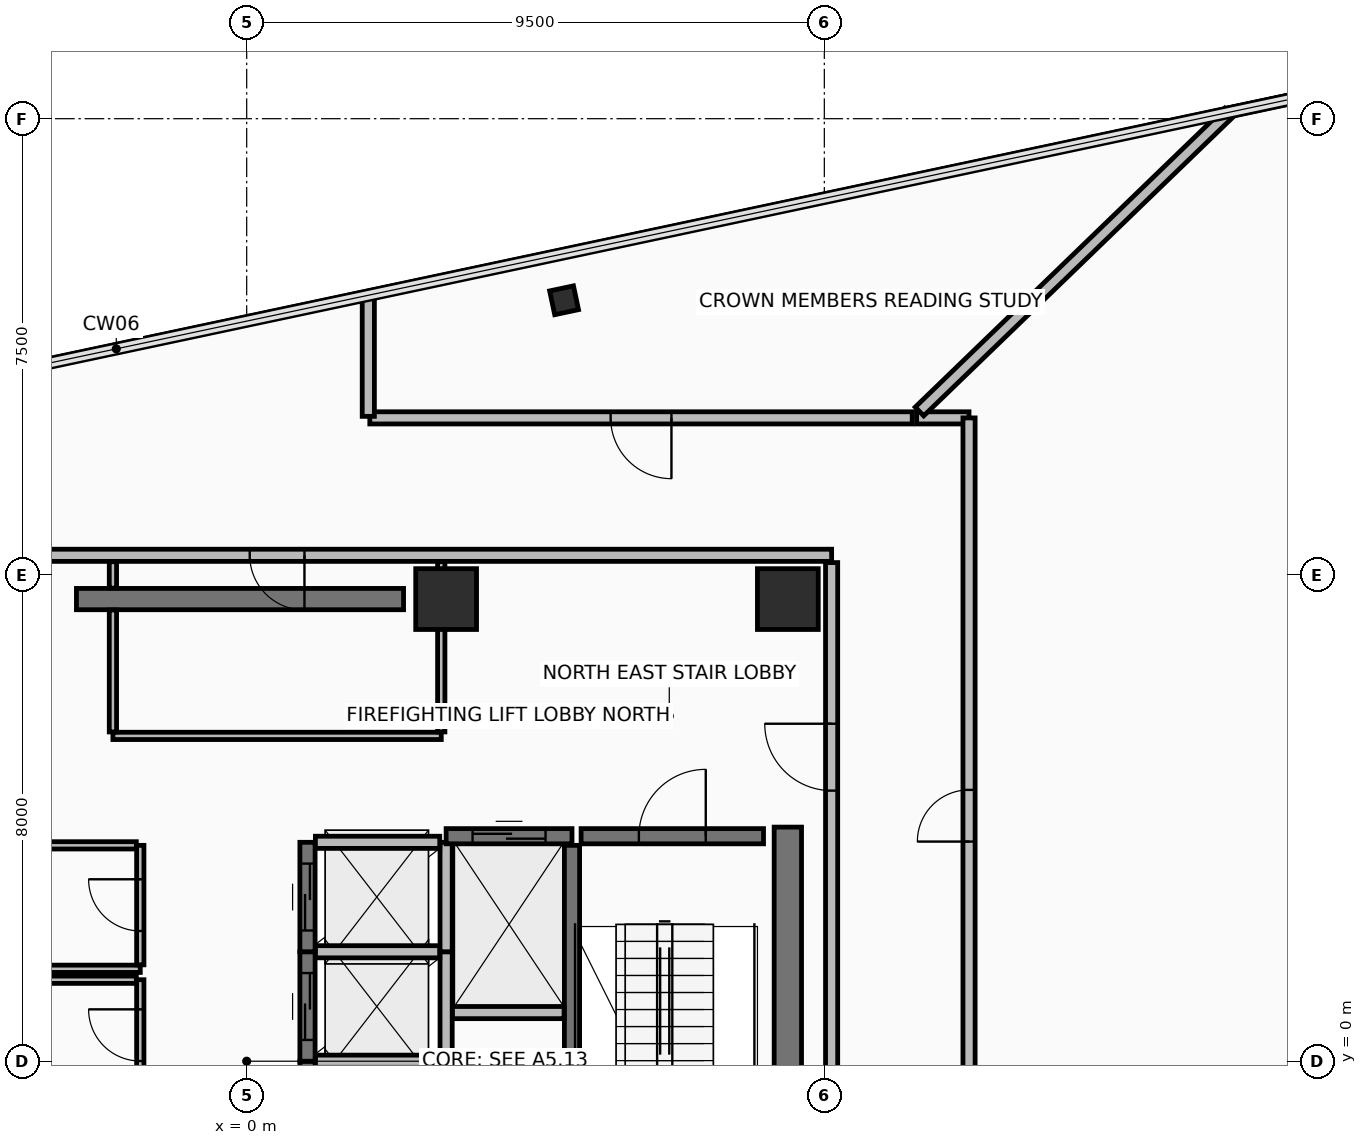
"""IFC4 building model, lengths in metres.
Left out: names, types, materials, properties, quantities, classifications, styles, units other than length and angle.
Written with IfcOpenShell. Run it as: python <this file> out.ifc"""

import sys

from ifc_helpers import new_model, si_unit, direction, frame, frame_2d, origin, origin_2d, place, context, subcontext, project, spatial, rectangle, hollow_rectangle, extrude, element, fill, save


model = new_model("IFC4")
c1 = context("Model", 3, precision=1e-05, world=origin(), true_north=direction((0.0, 1.0)))
c2 = subcontext(c1, "Body", "Model", "MODEL_VIEW")
j1 = project(units=[si_unit("LENGTHUNIT", "METRE"), si_unit("PLANEANGLEUNIT", "RADIAN")], contexts=[c1])
p1 = place(None, origin())
s1 = spatial("IfcSite", under=j1, at=p1, CompositionType="ELEMENT")
p2 = place(p1, origin())
s2 = spatial("IfcBuilding", under=s1, at=p2, CompositionType="ELEMENT")
p3 = place(p2, frame((0.0, 0.0, 283.4)))
s3 = spatial("IfcBuildingStorey", under=s2, at=p3, CompositionType="ELEMENT", Elevation=283.4)
for number, where, z_axis, x_axis in (
    (1, (8.9, 7.6, 0.0), (0.0, 0.0, 1.0), (1.0, 0.0, 0.0)),
    (2, (3.28, 7.6, 0.0), (0.0, 0.0, 1.0), (1.0, 0.0, 0.0)),
):
    element("IfcColumn", number, at=place(p3, frame(where, z_axis=z_axis, x_axis=x_axis)), inside=s3, PredefinedType="COLUMN", context=c2, shape_type="SweptSolid", body=[
        extrude(rectangle(XDim=1.0, YDim=1.0, at=origin_2d()), origin(), (0.0, 0.0, 1.0), 3.65),
    ])
p4 = place(p3, frame((5.22, 12.514, 0.0), z_axis=(0.0, 0.0, 1.0), x_axis=(0.978147237858, 0.207913398007, 0.0)))
e3 = element("IfcColumn", 3, at=p4, inside=s3, PredefinedType="COLUMN", context=c2, shape_type="SweptSolid", body=[
    extrude(hollow_rectangle(XDim=0.4, YDim=0.4, WallThickness=0.025, at=origin_2d()), origin(), (0.0, 0.0, 1.0), 3.65),
])
p5 = place(p3, frame((-2.8, 7.6, 0.0), z_axis=(0.0, 0.0, 1.0), x_axis=(1.0, 0.0, 0.0)))
e4 = element("IfcWall", 4, at=p5, inside=s3, PredefinedType="SHEAR", context=c2, shape_type="SweptSolid", body=[
    extrude(rectangle(XDim=5.38, YDim=0.35, at=frame_2d((2.69, 0.0))), origin(), (0.0, 0.0, 1.0), 3.465),
])
p6 = place(p3, frame((8.9, -6.85, 0.0), z_axis=(0.0, 0.0, 1.0), x_axis=(0.0, 1.0, 0.0)))
e5 = element("IfcWall", 5, at=p6, inside=s3, PredefinedType="SHEAR", context=c2, shape_type="SweptSolid", body=[
    extrude(rectangle(XDim=10.7, YDim=0.45, at=frame_2d((5.35, 0.0))), origin(), (0.0, 0.0, 1.0), 3.465),
])
p7 = place(p3, frame((9.62, 8.32, 0.0), z_axis=(0.0, 0.0, 1.0), x_axis=(-1.0, 0.0, 0.0)))
e6 = element("IfcWall", 6, at=p7, inside=s3, PredefinedType="PARTITIONING", context=c2, shape_type="SweptSolid", body=[
    extrude(rectangle(XDim=19.24, YDim=0.2, at=frame_2d((9.62, 0.0))), origin(), (0.0, 0.0, 1.0), 2.96),
])
p8 = place(p7, frame((8.67, 0.0, 0.0)))
e7 = element("IfcOpeningElement", 7, at=p8, cuts=e6, PredefinedType="OPENING", context=c2, shape_type="SweptSolid", body=[
    extrude(rectangle(XDim=0.9, YDim=2.1, at=frame_2d((0.45, 1.05))), frame((0.0, 0.11, 0.0), z_axis=(0.0, -1.0, 0.0), x_axis=(1.0, 0.0, 0.0)), (0.0, 0.0, 1.0), 0.22),
])
p9 = place(p7, frame((15.745, 0.0, 0.0)))
e8 = element("IfcOpeningElement", 8, at=p9, cuts=e6, PredefinedType="OPENING", context=c2, shape_type="SweptSolid", body=[
    extrude(rectangle(XDim=0.9, YDim=2.1, at=frame_2d((0.45, 1.05))), frame((0.0, 0.11, 0.0), z_axis=(0.0, -1.0, 0.0), x_axis=(1.0, 0.0, 0.0)), (0.0, 0.0, 1.0), 0.22),
])
p10 = place(p7, frame((13.795, 0.0, 0.0)))
e9 = element("IfcOpeningElement", 9, at=p10, cuts=e6, PredefinedType="OPENING", context=c2, shape_type="SweptSolid", body=[
    extrude(rectangle(XDim=0.9, YDim=2.1, at=frame_2d((0.45, 1.05))), frame((0.0, 0.11, 0.0), z_axis=(0.0, -1.0, 0.0), x_axis=(1.0, 0.0, 0.0)), (0.0, 0.0, 1.0), 0.22),
])
p11 = place(p3, frame((9.62, -8.2, 0.0), z_axis=(0.0, 0.0, 1.0), x_axis=(0.0, 1.0, 0.0)))
e10 = element("IfcWall", 10, at=p11, inside=s3, PredefinedType="PARTITIONING", context=c2, shape_type="SweptSolid", body=[
    extrude(rectangle(XDim=16.4, YDim=0.2, at=frame_2d((8.2, 0.0))), origin(), (0.0, 0.0, 1.0), 2.96),
])
p12 = place(p11, frame((12.65, 0.0, 0.0)))
e11 = element("IfcOpeningElement", 11, at=p12, cuts=e10, PredefinedType="OPENING", context=c2, shape_type="SweptSolid", body=[
    extrude(rectangle(XDim=1.1, YDim=2.15, at=frame_2d((0.55, 1.075))), frame((0.0, 0.11, 0.0), z_axis=(0.0, -1.0, 0.0), x_axis=(1.0, 0.0, 0.0)), (0.0, 0.0, 1.0), 0.22),
])
p13 = place(p3, frame((5.35, -3.75, 0.0), z_axis=(0.0, 0.0, 1.0), x_axis=(0.0, 1.0, 0.0)))
e12 = element("IfcWall", 12, at=p13, inside=s3, PredefinedType="SHEAR", context=c2, shape_type="SweptSolid", body=[
    extrude(rectangle(XDim=7.3, YDim=0.25, at=frame_2d((3.65, 0.0))), origin(), (0.0, 0.0, 1.0), 3.465),
])
p14 = place(p3, frame((5.5, 3.7, 0.0), z_axis=(0.0, 0.0, 1.0), x_axis=(1.0, 0.0, 0.0)))
e13 = element("IfcWall", 13, at=p14, inside=s3, PredefinedType="SHEAR", context=c2, shape_type="SweptSolid", body=[
    extrude(rectangle(XDim=3.0, YDim=0.25, at=frame_2d((1.5, 0.0))), origin(), (0.0, 0.0, 1.0), 3.465),
])
p15 = place(p14, frame((0.95, 0.0, 0.0)))
e14 = element("IfcOpeningElement", 14, at=p15, cuts=e13, PredefinedType="OPENING", context=c2, shape_type="SweptSolid", body=[
    extrude(rectangle(XDim=1.1, YDim=2.15, at=frame_2d((0.55, 1.075))), frame((0.0, 0.135, 0.0), z_axis=(0.0, -1.0, 0.0), x_axis=(1.0, 0.0, 0.0)), (0.0, 0.0, 1.0), 0.27),
])
p16 = place(p3, frame((1.0, -1.8, 0.0), z_axis=(0.0, 0.0, 1.0), x_axis=(0.0, 1.0, 0.0)))
e15 = element("IfcWall", 15, at=p16, inside=s3, PredefinedType="SHEAR", context=c2, shape_type="SweptSolid", body=[
    extrude(rectangle(XDim=1.8, YDim=0.25, at=frame_2d((0.9, 0.0))), origin(), (0.0, 0.0, 1.0), 3.465),
])
p17 = place(p16, frame((0.35, 0.0, 0.0)))
e16 = element("IfcOpeningElement", 16, at=p17, cuts=e15, PredefinedType="OPENING", context=c2, shape_type="SweptSolid", body=[
    extrude(rectangle(XDim=1.1, YDim=2.2, at=frame_2d((0.55, 1.1))), frame((0.0, 0.135, 0.0), z_axis=(0.0, -1.0, 0.0), x_axis=(1.0, 0.0, 0.0)), (0.0, 0.0, 1.0), 0.27),
])
p18 = place(p3, frame((3.28, -1.8, 0.0), z_axis=(0.0, 0.0, 1.0), x_axis=(0.0, 1.0, 0.0)))
e17 = element("IfcWall", 17, at=p18, inside=s3, PredefinedType="PARTITIONING", context=c2, shape_type="SweptSolid", body=[
    extrude(rectangle(XDim=1.8, YDim=0.2, at=frame_2d((0.9, 0.0))), origin(), (0.0, 0.0, 1.0), 3.465),
])
p19 = place(p3, frame((1.13, 0.0, 0.0), z_axis=(0.0, 0.0, 1.0), x_axis=(1.0, 0.0, 0.0)))
e18 = element("IfcWall", 18, at=p19, inside=s3, PredefinedType="PARTITIONING", context=c2, shape_type="SweptSolid", body=[
    extrude(rectangle(XDim=2.045, YDim=0.2, at=frame_2d((1.022, 0.0))), origin(), (0.0, 0.0, 1.0), 3.465),
])
p20 = place(p3, frame((1.0, 0.0, 0.0), z_axis=(0.0, 0.0, 1.0), x_axis=(0.0, 1.0, 0.0)))
e19 = element("IfcWall", 19, at=p20, inside=s3, PredefinedType="SHEAR", context=c2, shape_type="SweptSolid", body=[
    extrude(rectangle(XDim=1.8, YDim=0.25, at=frame_2d((0.9, 0.0))), origin(), (0.0, 0.0, 1.0), 3.465),
])
p21 = place(p20, frame((0.35, 0.0, 0.0)))
e20 = element("IfcOpeningElement", 20, at=p21, cuts=e19, PredefinedType="OPENING", context=c2, shape_type="SweptSolid", body=[
    extrude(rectangle(XDim=1.1, YDim=2.2, at=frame_2d((0.55, 1.1))), frame((0.0, 0.135, 0.0), z_axis=(0.0, -1.0, 0.0), x_axis=(1.0, 0.0, 0.0)), (0.0, 0.0, 1.0), 0.27),
])
p22 = place(p3, frame((3.28, 0.0, 0.0), z_axis=(0.0, 0.0, 1.0), x_axis=(0.0, 1.0, 0.0)))
e21 = element("IfcWall", 21, at=p22, inside=s3, PredefinedType="PARTITIONING", context=c2, shape_type="SweptSolid", body=[
    extrude(rectangle(XDim=1.8, YDim=0.2, at=frame_2d((0.9, 0.0))), origin(), (0.0, 0.0, 1.0), 3.465),
])
p23 = place(p3, frame((1.13, 1.8, 0.0), z_axis=(0.0, 0.0, 1.0), x_axis=(1.0, 0.0, 0.0)))
e22 = element("IfcWall", 22, at=p23, inside=s3, PredefinedType="PARTITIONING", context=c2, shape_type="SweptSolid", body=[
    extrude(rectangle(XDim=2.045, YDim=0.2, at=frame_2d((1.022, 0.0))), origin(), (0.0, 0.0, 1.0), 3.465),
])
p24 = place(p3, frame((1.0, 1.8, 0.0), z_axis=(0.0, 0.0, 1.0), x_axis=(0.0, 1.0, 0.0)))
e23 = element("IfcWall", 23, at=p24, inside=s3, PredefinedType="SHEAR", context=c2, shape_type="SweptSolid", body=[
    extrude(rectangle(XDim=1.8, YDim=0.25, at=frame_2d((0.9, 0.0))), origin(), (0.0, 0.0, 1.0), 3.465),
])
p25 = place(p24, frame((0.35, 0.0, 0.0)))
e24 = element("IfcOpeningElement", 24, at=p25, cuts=e23, PredefinedType="OPENING", context=c2, shape_type="SweptSolid", body=[
    extrude(rectangle(XDim=1.1, YDim=2.2, at=frame_2d((0.55, 1.1))), frame((0.0, 0.135, 0.0), z_axis=(0.0, -1.0, 0.0), x_axis=(1.0, 0.0, 0.0)), (0.0, 0.0, 1.0), 0.27),
])
p26 = place(p3, frame((3.28, 1.8, 0.0), z_axis=(0.0, 0.0, 1.0), x_axis=(0.0, 1.0, 0.0)))
e25 = element("IfcWall", 25, at=p26, inside=s3, PredefinedType="PARTITIONING", context=c2, shape_type="SweptSolid", body=[
    extrude(rectangle(XDim=1.8, YDim=0.2, at=frame_2d((0.9, 0.0))), origin(), (0.0, 0.0, 1.0), 3.465),
])
p27 = place(p3, frame((1.13, 3.6, 0.0), z_axis=(0.0, 0.0, 1.0), x_axis=(1.0, 0.0, 0.0)))
e26 = element("IfcWall", 26, at=p27, inside=s3, PredefinedType="PARTITIONING", context=c2, shape_type="SweptSolid", body=[
    extrude(rectangle(XDim=2.045, YDim=0.2, at=frame_2d((1.022, 0.0))), origin(), (0.0, 0.0, 1.0), 2.76),
])
p28 = place(p3, frame((3.28, 3.7, 0.0), z_axis=(0.0, 0.0, 1.0), x_axis=(1.0, 0.0, 0.0)))
e27 = element("IfcWall", 27, at=p28, inside=s3, PredefinedType="SHEAR", context=c2, shape_type="SweptSolid", body=[
    extrude(rectangle(XDim=2.07, YDim=0.25, at=frame_2d((1.035, 0.0))), origin(), (0.0, 0.0, 1.0), 3.465),
])
p29 = place(p28, frame((0.435, 0.0, 0.0)))
e28 = element("IfcOpeningElement", 28, at=p29, cuts=e27, PredefinedType="OPENING", context=c2, shape_type="SweptSolid", body=[
    extrude(rectangle(XDim=1.2, YDim=2.2, at=frame_2d((0.6, 1.1))), frame((0.0, 0.135, 0.0), z_axis=(0.0, -1.0, 0.0), x_axis=(1.0, 0.0, 0.0)), (0.0, 0.0, 1.0), 0.27),
])
p30 = place(p3, frame((3.385, 0.8, 0.0), z_axis=(0.0, 0.0, 1.0), x_axis=(1.0, 0.0, 0.0)))
e29 = element("IfcWall", 29, at=p30, inside=s3, PredefinedType="PARTITIONING", context=c2, shape_type="SweptSolid", body=[
    extrude(rectangle(XDim=1.835, YDim=0.2, at=frame_2d((0.917, 0.0))), origin(), (0.0, 0.0, 1.0), 3.465),
])
p31 = place(p3, frame((-5.22, 1.52, 0.0), z_axis=(0.0, 0.0, 1.0), x_axis=(1.0, 0.0, 0.0)))
e30 = element("IfcWall", 30, at=p31, inside=s3, PredefinedType="PARTITIONING", context=c2, shape_type="SweptSolid", body=[
    extrude(rectangle(XDim=3.47, YDim=0.12, at=frame_2d((1.735, 0.0))), origin(), (0.0, 0.0, 1.0), 3.465),
])
p32 = place(p3, frame((-1.75, 1.585, 0.0), z_axis=(0.0, 0.0, 1.0), x_axis=(0.0, 1.0, 0.0)))
e31 = element("IfcWall", 31, at=p32, inside=s3, PredefinedType="PARTITIONING", context=c2, shape_type="SweptSolid", body=[
    extrude(rectangle(XDim=1.965, YDim=0.12, at=frame_2d((0.982, 0.0))), origin(), (0.0, 0.0, 1.0), 3.465),
])
p33 = place(p32, frame((0.557, 0.0, 0.0)))
e32 = element("IfcOpeningElement", 32, at=p33, cuts=e31, PredefinedType="OPENING", context=c2, shape_type="SweptSolid", body=[
    extrude(rectangle(XDim=0.85, YDim=2.1, at=frame_2d((0.425, 1.05))), frame((0.0, 0.07, 0.0), z_axis=(0.0, -1.0, 0.0), x_axis=(1.0, 0.0, 0.0)), (0.0, 0.0, 1.0), 0.14),
])
p34 = place(p3, frame((-1.815, 3.55, 0.0), z_axis=(0.0, 0.0, 1.0), x_axis=(-1.0, 0.0, 0.0)))
e33 = element("IfcWall", 33, at=p34, inside=s3, PredefinedType="PARTITIONING", context=c2, shape_type="SweptSolid", body=[
    extrude(rectangle(XDim=3.405, YDim=0.12, at=frame_2d((1.703, 0.0))), origin(), (0.0, 0.0, 1.0), 3.465),
])
p35 = place(p3, frame((-1.75, -0.485, 0.0), z_axis=(0.0, 0.0, 1.0), x_axis=(0.0, 1.0, 0.0)))
e34 = element("IfcWall", 34, at=p35, inside=s3, PredefinedType="PARTITIONING", context=c2, shape_type="SweptSolid", body=[
    extrude(rectangle(XDim=1.825, YDim=0.12, at=frame_2d((0.913, 0.0))), origin(), (0.0, 0.0, 1.0), 3.465),
])
p36 = place(p35, frame((0.488, 0.0, 0.0)))
e35 = element("IfcOpeningElement", 35, at=p36, cuts=e34, PredefinedType="OPENING", context=c2, shape_type="SweptSolid", body=[
    extrude(rectangle(XDim=0.85, YDim=2.1, at=frame_2d((0.425, 1.05))), frame((0.0, 0.07, 0.0), z_axis=(0.0, -1.0, 0.0), x_axis=(1.0, 0.0, 0.0)), (0.0, 0.0, 1.0), 0.14),
])
p37 = place(p3, frame((-1.815, 1.34, 0.0), z_axis=(0.0, 0.0, 1.0), x_axis=(-1.0, 0.0, 0.0)))
e36 = element("IfcWall", 36, at=p37, inside=s3, PredefinedType="PARTITIONING", context=c2, shape_type="SweptSolid", body=[
    extrude(rectangle(XDim=3.405, YDim=0.12, at=frame_2d((1.703, 0.0))), origin(), (0.0, 0.0, 1.0), 3.465),
])
p38 = place(p3, frame((-2.2, 5.35, 0.0), z_axis=(0.0, 0.0, 1.0), x_axis=(1.0, 0.0, 0.0)))
e37 = element("IfcWall", 37, at=p38, inside=s3, PredefinedType="PARTITIONING", context=c2, shape_type="SweptSolid", body=[
    extrude(rectangle(XDim=5.4, YDim=0.12, at=frame_2d((2.7, 0.0))), origin(), (0.0, 0.0, 1.0), 2.76),
])
p39 = place(p3, frame((3.2, 5.415, 0.0), z_axis=(0.0, 0.0, 1.0), x_axis=(0.0, 1.0, 0.0)))
e38 = element("IfcWall", 38, at=p39, inside=s3, PredefinedType="PARTITIONING", context=c2, shape_type="SweptSolid", body=[
    extrude(rectangle(XDim=2.8, YDim=0.12, at=frame_2d((1.4, 0.0))), origin(), (0.0, 0.0, 1.0), 2.76),
])
p40 = place(p3, frame((-2.2, 8.215, 0.0), z_axis=(0.0, 0.0, 1.0), x_axis=(0.0, -1.0, 0.0)))
e39 = element("IfcWall", 39, at=p40, inside=s3, PredefinedType="PARTITIONING", context=c2, shape_type="SweptSolid", body=[
    extrude(rectangle(XDim=0.435, YDim=0.12, at=frame_2d((0.218, 0.0))), origin(), (0.0, 0.0, 1.0), 2.76),
])
p41 = place(p3, frame((-2.2, 7.42, 0.0), z_axis=(0.0, 0.0, 1.0), x_axis=(0.0, -1.0, 0.0)))
e40 = element("IfcWall", 40, at=p41, inside=s3, PredefinedType="PARTITIONING", context=c2, shape_type="SweptSolid", body=[
    extrude(rectangle(XDim=2.005, YDim=0.12, at=frame_2d((1.002, 0.0))), origin(), (0.0, 0.0, 1.0), 2.76),
])
p42 = place(p3, frame((11.879, 10.58, 0.0), z_axis=(0.0, 0.0, 1.0), x_axis=(-1.0, 0.0, 0.0)))
e41 = element("IfcWall", 41, at=p42, inside=s3, PredefinedType="PARTITIONING", context=c2, shape_type="SweptSolid", body=[
    extrude(rectangle(XDim=0.862, YDim=0.2, at=frame_2d((0.431, 0.0))), origin(), (0.0, 0.0, 1.0), 3.465),
])
p43 = place(p3, frame((11.065, 10.685, 0.0), z_axis=(0.0, 0.0, 1.0), x_axis=(0.719349741171, 0.694648076278, 0.0)))
e42 = element("IfcWall", 42, at=p43, inside=s3, PredefinedType="PARTITIONING", context=c2, shape_type="SweptSolid", body=[
    extrude(rectangle(XDim=7.077, YDim=0.2, at=frame_2d((3.538, 0.0))), origin(), (0.0, 0.0, 1.0), 2.81),
])
p44 = place(p3, frame((16.167, 15.607, 0.0), z_axis=(0.0, 0.0, 1.0), x_axis=(0.978147425174, 0.207912516762, 0.0)))
e43 = element("IfcWall", 43, at=p44, inside=s3, PredefinedType="PARTITIONING", context=c2, shape_type="SweptSolid", body=[
    extrude(rectangle(XDim=4.508, YDim=0.15, at=frame_2d((2.254, 0.0))), origin(), (0.0, 0.0, 1.0), 3.465),
])
p45 = place(p3, frame((11.88, -2.505, 0.0), z_axis=(0.0, 0.0, 1.0), x_axis=(0.0, 1.0, 0.0)))
e44 = element("IfcWall", 44, at=p45, inside=s3, PredefinedType="PARTITIONING", context=c2, shape_type="SweptSolid", body=[
    extrude(rectangle(XDim=13.084, YDim=0.2, at=frame_2d((6.542, 0.0))), origin(), (0.0, 0.0, 1.0), 2.96),
])
p46 = place(p45, frame((6.117, 0.0, 0.0)))
e45 = element("IfcOpeningElement", 45, at=p46, cuts=e44, PredefinedType="OPENING", context=c2, shape_type="SweptSolid", body=[
    extrude(rectangle(XDim=0.85, YDim=2.1, at=frame_2d((0.425, 1.05))), frame((0.0, 0.11, 0.0), z_axis=(0.0, -1.0, 0.0), x_axis=(1.0, 0.0, 0.0)), (0.0, 0.0, 1.0), 0.22),
])
p47 = place(p3, frame((10.946, 10.58, 0.0), z_axis=(0.0, 0.0, 1.0), x_axis=(-1.0, 0.0, 0.0)))
e46 = element("IfcWall", 46, at=p47, inside=s3, PredefinedType="PARTITIONING", context=c2, shape_type="SweptSolid", body=[
    extrude(rectangle(XDim=8.921, YDim=0.2, at=frame_2d((4.46, 0.0))), origin(), (0.0, 0.0, 1.0), 2.96),
])
p48 = place(p47, frame((3.96, 0.0, 0.0)))
e47 = element("IfcOpeningElement", 47, at=p48, cuts=e46, PredefinedType="OPENING", context=c2, shape_type="SweptSolid", body=[
    extrude(rectangle(XDim=1.0, YDim=2.15, at=frame_2d((0.5, 1.075))), frame((0.0, 0.11, 0.0), z_axis=(0.0, -1.0, 0.0), x_axis=(1.0, 0.0, 0.0)), (0.0, 0.0, 1.0), 0.22),
])
p49 = place(p3, frame((2.0, 10.605, 0.0), z_axis=(0.0, 0.0, 1.0), x_axis=(0.0, 1.0, 0.0)))
e48 = element("IfcWall", 48, at=p49, inside=s3, PredefinedType="PARTITIONING", context=c2, shape_type="SweptSolid", body=[
    extrude(rectangle(XDim=1.991, YDim=0.2, at=frame_2d((0.996, 0.0))), origin(), (0.0, 0.0, 1.0), 2.81),
])
p50 = place(p12, frame((1.1, 0.0, 0.0), z_axis=(0.0, 0.0, 1.0), x_axis=(-1.0, 0.0, 0.0)))
e49 = element("IfcDoor", 49, at=p50, inside=s3, OperationType="SINGLE_SWING_LEFT", PredefinedType="DOOR", context=c2, shape_type="SweptSolid", body=[
    extrude(rectangle(XDim=1.1, YDim=2.15, at=frame_2d((0.55, 1.075))), frame((0.0, 0.025, 0.0), z_axis=(0.0, -1.0, 0.0), x_axis=(1.0, 0.0, 0.0)), (0.0, 0.0, 1.0), 0.05),
])
fill(e11, e49)
p51 = place(p15, frame((1.1, 0.0, 0.0), z_axis=(0.0, 0.0, 1.0), x_axis=(-1.0, 0.0, 0.0)))
e50 = element("IfcDoor", 50, at=p51, inside=s3, OperationType="SINGLE_SWING_LEFT", PredefinedType="DOOR", context=c2, shape_type="SweptSolid", body=[
    extrude(rectangle(XDim=1.1, YDim=2.15, at=frame_2d((0.55, 1.075))), frame((0.0, 0.025, 0.0), z_axis=(0.0, -1.0, 0.0), x_axis=(1.0, 0.0, 0.0)), (0.0, 0.0, 1.0), 0.05),
])
fill(e14, e50)
p52 = place(p21, origin())
e51 = element("IfcDoor", 51, at=p52, inside=s3, OperationType="SLIDING_TO_LEFT", PredefinedType="DOOR", context=c2, shape_type="SweptSolid", body=[
    extrude(rectangle(XDim=1.1, YDim=2.2, at=frame_2d((0.55, 1.1))), frame((0.0, 0.025, 0.0), z_axis=(0.0, -1.0, 0.0), x_axis=(1.0, 0.0, 0.0)), (0.0, 0.0, 1.0), 0.05),
])
fill(e20, e51)
p53 = place(p25, origin())
e52 = element("IfcDoor", 52, at=p53, inside=s3, OperationType="SLIDING_TO_LEFT", PredefinedType="DOOR", context=c2, shape_type="SweptSolid", body=[
    extrude(rectangle(XDim=1.1, YDim=2.2, at=frame_2d((0.55, 1.1))), frame((0.0, 0.025, 0.0), z_axis=(0.0, -1.0, 0.0), x_axis=(1.0, 0.0, 0.0)), (0.0, 0.0, 1.0), 0.05),
])
fill(e24, e52)
p54 = place(p29, origin())
e53 = element("IfcDoor", 53, at=p54, inside=s3, OperationType="SLIDING_TO_RIGHT", PredefinedType="DOOR", context=c2, shape_type="SweptSolid", body=[
    extrude(rectangle(XDim=1.2, YDim=2.2, at=frame_2d((0.6, 1.1))), frame((0.0, 0.025, 0.0), z_axis=(0.0, -1.0, 0.0), x_axis=(1.0, 0.0, 0.0)), (0.0, 0.0, 1.0), 0.05),
])
fill(e28, e53)
p55 = place(p33, frame((0.85, 0.0, 0.0), z_axis=(0.0, 0.0, 1.0), x_axis=(-1.0, 0.0, 0.0)))
e54 = element("IfcDoor", 54, at=p55, inside=s3, OperationType="SINGLE_SWING_RIGHT", PredefinedType="DOOR", context=c2, shape_type="SweptSolid", body=[
    extrude(rectangle(XDim=0.85, YDim=2.1, at=frame_2d((0.425, 1.05))), frame((0.0, 0.025, 0.0), z_axis=(0.0, -1.0, 0.0), x_axis=(1.0, 0.0, 0.0)), (0.0, 0.0, 1.0), 0.05),
])
fill(e32, e54)
p56 = place(p36, frame((0.85, 0.0, 0.0), z_axis=(0.0, 0.0, 1.0), x_axis=(-1.0, 0.0, 0.0)))
e55 = element("IfcDoor", 55, at=p56, inside=s3, OperationType="SINGLE_SWING_RIGHT", PredefinedType="DOOR", context=c2, shape_type="SweptSolid", body=[
    extrude(rectangle(XDim=0.85, YDim=2.1, at=frame_2d((0.425, 1.05))), frame((0.0, 0.025, 0.0), z_axis=(0.0, -1.0, 0.0), x_axis=(1.0, 0.0, 0.0)), (0.0, 0.0, 1.0), 0.05),
])
fill(e35, e55)
p57 = place(p8, origin())
e56 = element("IfcDoor", 56, at=p57, inside=s3, OperationType="SINGLE_SWING_LEFT", PredefinedType="DOOR", context=c2, shape_type="SweptSolid", body=[
    extrude(rectangle(XDim=0.9, YDim=2.1, at=frame_2d((0.45, 1.05))), frame((0.0, 0.025, 0.0), z_axis=(0.0, -1.0, 0.0), x_axis=(1.0, 0.0, 0.0)), (0.0, 0.0, 1.0), 0.05),
])
fill(e7, e56)
p58 = place(p46, origin())
e57 = element("IfcDoor", 57, at=p58, inside=s3, OperationType="SINGLE_SWING_RIGHT", PredefinedType="DOOR", context=c2, shape_type="SweptSolid", body=[
    extrude(rectangle(XDim=0.85, YDim=2.1, at=frame_2d((0.425, 1.05))), frame((0.0, 0.025, 0.0), z_axis=(0.0, -1.0, 0.0), x_axis=(1.0, 0.0, 0.0)), (0.0, 0.0, 1.0), 0.05),
])
fill(e45, e57)
p59 = place(p48, origin())
e58 = element("IfcDoor", 58, at=p59, inside=s3, OperationType="SINGLE_SWING_RIGHT", PredefinedType="DOOR", context=c2, shape_type="SweptSolid", body=[
    extrude(rectangle(XDim=1.0, YDim=2.15, at=frame_2d((0.5, 1.075))), frame((0.0, 0.025, 0.0), z_axis=(0.0, -1.0, 0.0), x_axis=(1.0, 0.0, 0.0)), (0.0, 0.0, 1.0), 0.05),
])
fill(e47, e58)
save(model, sys.argv[1])
